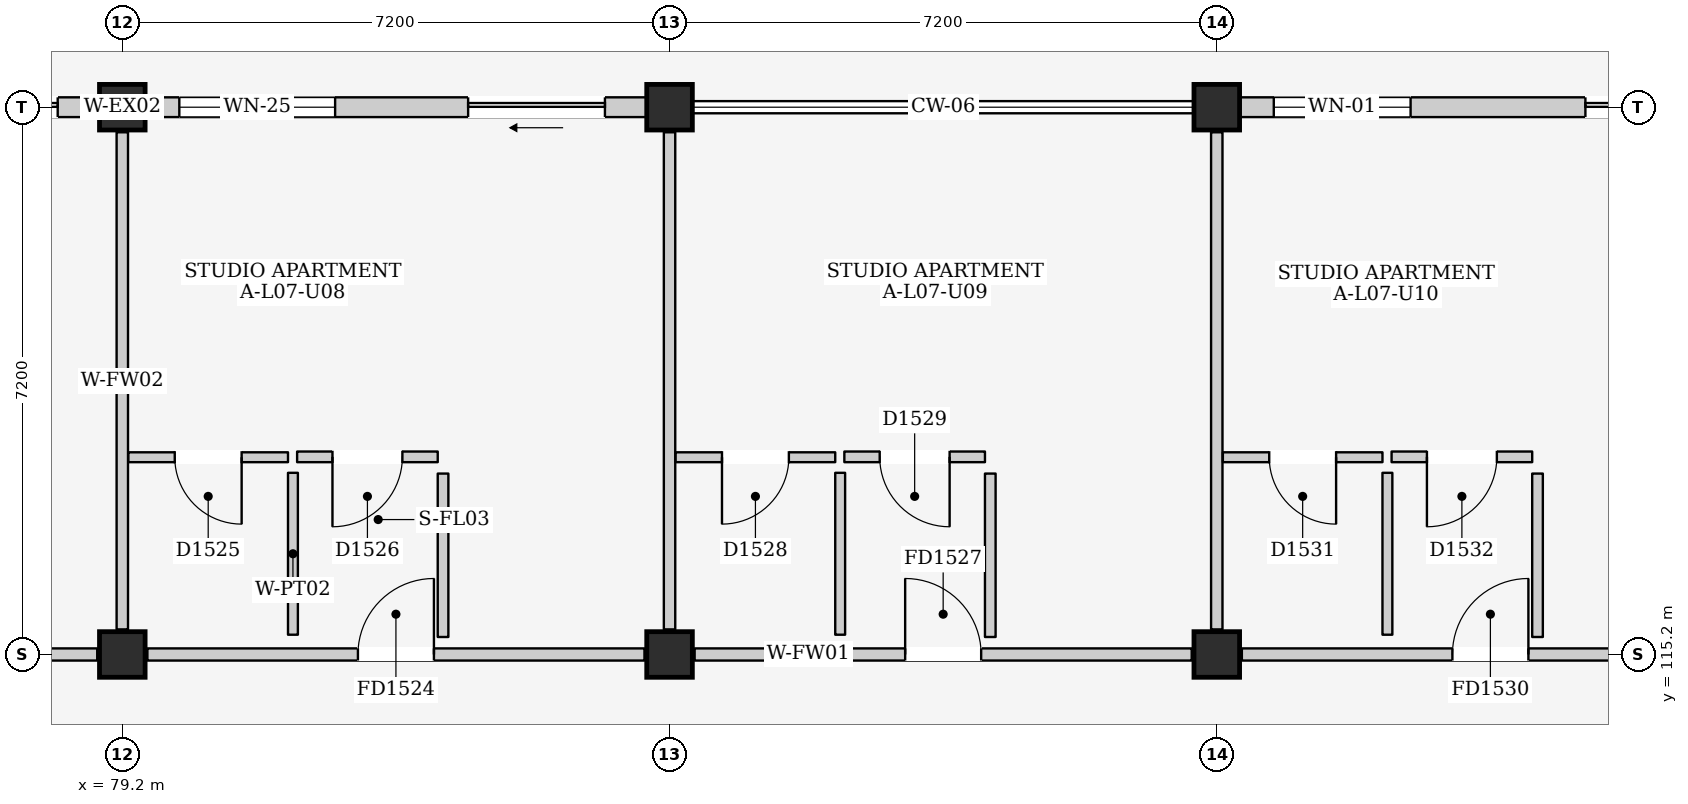
"""IFC4 building model, lengths in metres.
Left out: names, types, materials, properties, quantities, classifications, styles, units other than length and angle.
Written with IfcOpenShell. Run it as: python <this file> out.ifc"""

import sys

from ifc_helpers import new_model, si_unit, direction, frame, frame_2d, origin, origin_2d, place, context, subcontext, project, spatial, rectangle, extrude, element, fill, save


model = new_model("IFC4")
c1 = context("Model", 3, precision=1e-05, world=origin(), true_north=direction((0.0, 1.0)))
c2 = subcontext(c1, "Body", "Model", "MODEL_VIEW")
j1 = project(units=[si_unit("LENGTHUNIT", "METRE"), si_unit("PLANEANGLEUNIT", "RADIAN")], contexts=[c1])
p1 = place(None, origin())
s1 = spatial("IfcSite", under=j1, at=p1, CompositionType="ELEMENT")
p2 = place(p1, origin())
s2 = spatial("IfcBuilding", under=s1, at=p2, CompositionType="ELEMENT")
p3 = place(p2, frame((0.0, 0.0, 25.1)))
s3 = spatial("IfcBuildingStorey", under=s2, at=p3, CompositionType="ELEMENT", Elevation=25.1)
for number, where, z_axis, x_axis in (
    (1, (79.2, 115.2, 0.0), (0.0, 0.0, 1.0), (1.0, 0.0, 0.0)),
    (2, (79.2, 122.4, 0.0), (0.0, 0.0, 1.0), (1.0, 0.0, 0.0)),
    (3, (86.4, 115.2, 0.0), (0.0, 0.0, 1.0), (1.0, 0.0, 0.0)),
    (4, (86.4, 122.4, 0.0), (0.0, 0.0, 1.0), (1.0, 0.0, 0.0)),
    (5, (93.6, 115.2, 0.0), (0.0, 0.0, 1.0), (1.0, 0.0, 0.0)),
    (6, (93.6, 122.4, 0.0), (0.0, 0.0, 1.0), (1.0, 0.0, 0.0)),
):
    element("IfcColumn", number, at=place(p3, frame(where, z_axis=z_axis, x_axis=x_axis)), inside=s3, PredefinedType="COLUMN", context=c2, shape_type="SweptSolid", body=[
        extrude(rectangle(XDim=0.6, YDim=0.6, at=origin_2d()), origin(), (0.0, 0.0, 1.0), 3.2),
    ])
p4 = place(p3, frame((72.3, 122.4, 0.0), z_axis=(0.0, 0.0, 1.0), x_axis=(1.0, 0.0, 0.0)))
e7 = element("IfcWall", 7, at=p4, inside=s3, PredefinedType="ELEMENTEDWALL", context=c2, shape_type="SweptSolid", body=[
    extrude(rectangle(XDim=6.6, YDim=0.26, at=frame_2d((3.3, 0.0))), origin(), (0.0, 0.0, 1.0), 2.525),
])
p5 = place(p4, frame((4.65, 0.0, 0.0)))
e8 = element("IfcOpeningElement", 8, at=p5, cuts=e7, PredefinedType="OPENING", context=c2, shape_type="SweptSolid", body=[
    extrude(rectangle(XDim=1.4, YDim=2.1, at=frame_2d((0.7, 1.05))), frame((0.0, 0.145, 0.0), z_axis=(0.0, -1.0, 0.0), x_axis=(1.0, 0.0, 0.0)), (0.0, 0.0, 1.0), 0.29),
])
p6 = place(p4, frame((0.45, 0.0, 0.9)))
e9 = element("IfcOpeningElement", 9, at=p6, cuts=e7, PredefinedType="OPENING", context=c2, shape_type="SweptSolid", body=[
    extrude(rectangle(XDim=1.3, YDim=1.25, at=frame_2d((0.65, 0.625))), frame((0.0, 0.145, 0.0), z_axis=(0.0, -1.0, 0.0), x_axis=(1.0, 0.0, 0.0)), (0.0, 0.0, 1.0), 0.29),
])
p7 = place(p3, frame((79.5, 122.4, 0.0), z_axis=(0.0, 0.0, 1.0), x_axis=(1.0, 0.0, 0.0)))
e10 = element("IfcWall", 10, at=p7, inside=s3, PredefinedType="ELEMENTEDWALL", context=c2, shape_type="SweptSolid", body=[
    extrude(rectangle(XDim=6.6, YDim=0.26, at=frame_2d((3.3, 0.0))), origin(), (0.0, 0.0, 1.0), 2.525),
])
p8 = place(p7, frame((4.25, 0.0, 0.0)))
e11 = element("IfcOpeningElement", 11, at=p8, cuts=e10, PredefinedType="OPENING", context=c2, shape_type="SweptSolid", body=[
    extrude(rectangle(XDim=1.8, YDim=2.12, at=frame_2d((0.9, 1.06))), frame((0.0, 0.145, 0.0), z_axis=(0.0, -1.0, 0.0), x_axis=(1.0, 0.0, 0.0)), (0.0, 0.0, 1.0), 0.29),
])
p9 = place(p7, frame((0.45, 0.0, 0.815)))
e12 = element("IfcOpeningElement", 12, at=p9, cuts=e10, PredefinedType="OPENING", context=c2, shape_type="SweptSolid", body=[
    extrude(rectangle(XDim=2.05, YDim=1.6, at=frame_2d((1.025, 0.8))), frame((0.0, 0.145, 0.0), z_axis=(0.0, -1.0, 0.0), x_axis=(1.0, 0.0, 0.0)), (0.0, 0.0, 1.0), 0.29),
])
p10 = place(p3, frame((93.9, 122.4, 0.0), z_axis=(0.0, 0.0, 1.0), x_axis=(1.0, 0.0, 0.0)))
e13 = element("IfcWall", 13, at=p10, inside=s3, PredefinedType="ELEMENTEDWALL", context=c2, shape_type="SweptSolid", body=[
    extrude(rectangle(XDim=6.6, YDim=0.26, at=frame_2d((3.3, 0.0))), origin(), (0.0, 0.0, 1.0), 2.525),
])
p11 = place(p10, frame((4.55, 0.0, 0.0)))
e14 = element("IfcOpeningElement", 14, at=p11, cuts=e13, PredefinedType="OPENING", context=c2, shape_type="SweptSolid", body=[
    extrude(rectangle(XDim=1.5, YDim=2.12, at=frame_2d((0.75, 1.06))), frame((0.0, 0.145, 0.0), z_axis=(0.0, -1.0, 0.0), x_axis=(1.0, 0.0, 0.0)), (0.0, 0.0, 1.0), 0.29),
])
p12 = place(p10, frame((0.45, 0.0, 0.9)))
e15 = element("IfcOpeningElement", 15, at=p12, cuts=e13, PredefinedType="OPENING", context=c2, shape_type="SweptSolid", body=[
    extrude(rectangle(XDim=1.8, YDim=1.5, at=frame_2d((0.9, 0.75))), frame((0.0, 0.145, 0.0), z_axis=(0.0, -1.0, 0.0), x_axis=(1.0, 0.0, 0.0)), (0.0, 0.0, 1.0), 0.29),
])
p13 = place(p3, frame((72.33, 115.2, 0.0), z_axis=(0.0, 0.0, 1.0), x_axis=(1.0, 0.0, 0.0)))
e16 = element("IfcWall", 16, at=p13, inside=s3, PredefinedType="PARTITIONING", context=c2, shape_type="SweptSolid", body=[
    extrude(rectangle(XDim=6.54, YDim=0.16, at=frame_2d((3.27, 0.0))), origin(), (0.0, 0.0, 1.0), 2.325),
])
p14 = place(p13, frame((2.77, 0.0, 0.0)))
e17 = element("IfcOpeningElement", 17, at=p14, cuts=e16, PredefinedType="OPENING", context=c2, shape_type="SweptSolid", body=[
    extrude(rectangle(XDim=1.0, YDim=2.15, at=frame_2d((0.5, 1.075))), frame((0.0, 0.095, 0.0), z_axis=(0.0, -1.0, 0.0), x_axis=(1.0, 0.0, 0.0)), (0.0, 0.0, 1.0), 0.19),
])
p15 = place(p3, frame((79.2, 115.53, 0.0), z_axis=(0.0, 0.0, 1.0), x_axis=(0.0, 1.0, 0.0)))
e18 = element("IfcWall", 18, at=p15, inside=s3, PredefinedType="PARTITIONING", context=c2, shape_type="SweptSolid", body=[
    extrude(rectangle(XDim=6.54, YDim=0.15, at=frame_2d((3.27, 0.0))), origin(), (0.0, 0.0, 1.0), 2.475),
])
p16 = place(p3, frame((79.53, 115.2, 0.0), z_axis=(0.0, 0.0, 1.0), x_axis=(1.0, 0.0, 0.0)))
e19 = element("IfcWall", 19, at=p16, inside=s3, PredefinedType="PARTITIONING", context=c2, shape_type="SweptSolid", body=[
    extrude(rectangle(XDim=6.54, YDim=0.16, at=frame_2d((3.27, 0.0))), origin(), (0.0, 0.0, 1.0), 2.325),
])
p17 = place(p16, frame((2.77, 0.0, 0.0)))
e20 = element("IfcOpeningElement", 20, at=p17, cuts=e19, PredefinedType="OPENING", context=c2, shape_type="SweptSolid", body=[
    extrude(rectangle(XDim=1.0, YDim=2.15, at=frame_2d((0.5, 1.075))), frame((0.0, 0.095, 0.0), z_axis=(0.0, -1.0, 0.0), x_axis=(1.0, 0.0, 0.0)), (0.0, 0.0, 1.0), 0.19),
])
p18 = place(p3, frame((86.4, 115.53, 0.0), z_axis=(0.0, 0.0, 1.0), x_axis=(0.0, 1.0, 0.0)))
e21 = element("IfcWall", 21, at=p18, inside=s3, PredefinedType="PARTITIONING", context=c2, shape_type="SweptSolid", body=[
    extrude(rectangle(XDim=6.54, YDim=0.15, at=frame_2d((3.27, 0.0))), origin(), (0.0, 0.0, 1.0), 2.475),
])
p19 = place(p3, frame((79.28, 117.795, 0.0), z_axis=(0.0, 0.0, 1.0), x_axis=(1.0, 0.0, 0.0)))
e22 = element("IfcWall", 22, at=p19, inside=s3, PredefinedType="PARTITIONING", context=c2, shape_type="SweptSolid", body=[
    extrude(rectangle(XDim=2.1, YDim=0.13, at=frame_2d((1.05, 0.0))), origin(), (0.0, 0.0, 1.0), 2.99),
])
p20 = place(p19, frame((0.61, 0.0, 0.0)))
e23 = element("IfcOpeningElement", 23, at=p20, cuts=e22, PredefinedType="OPENING", context=c2, shape_type="SweptSolid", body=[
    extrude(rectangle(XDim=0.88, YDim=2.1, at=frame_2d((0.44, 1.05))), frame((0.0, 0.08, 0.0), z_axis=(0.0, -1.0, 0.0), x_axis=(1.0, 0.0, 0.0)), (0.0, 0.0, 1.0), 0.16),
])
p21 = place(p3, frame((81.445, 115.46, 0.0), z_axis=(0.0, 0.0, 1.0), x_axis=(0.0, 1.0, 0.0)))
e24 = element("IfcWall", 24, at=p21, inside=s3, PredefinedType="PARTITIONING", context=c2, shape_type="SweptSolid", body=[
    extrude(rectangle(XDim=2.13, YDim=0.13, at=frame_2d((1.065, 0.0))), origin(), (0.0, 0.0, 1.0), 2.99),
])
p22 = place(p3, frame((81.5, 117.8, 0.0), z_axis=(0.0, 0.0, 1.0), x_axis=(1.0, 0.0, 0.0)))
e25 = element("IfcWall", 25, at=p22, inside=s3, PredefinedType="PARTITIONING", context=c2, shape_type="SweptSolid", body=[
    extrude(rectangle(XDim=1.85, YDim=0.14, at=frame_2d((0.925, 0.0))), origin(), (0.0, 0.0, 1.0), 2.99),
])
p23 = place(p22, frame((0.465, 0.0, 0.0)))
e26 = element("IfcOpeningElement", 26, at=p23, cuts=e25, PredefinedType="OPENING", context=c2, shape_type="SweptSolid", body=[
    extrude(rectangle(XDim=0.92, YDim=2.1, at=frame_2d((0.46, 1.05))), frame((0.0, 0.085, 0.0), z_axis=(0.0, -1.0, 0.0), x_axis=(1.0, 0.0, 0.0)), (0.0, 0.0, 1.0), 0.17),
])
p24 = place(p3, frame((83.42, 115.43, 0.0), z_axis=(0.0, 0.0, 1.0), x_axis=(0.0, 1.0, 0.0)))
e27 = element("IfcWall", 27, at=p24, inside=s3, PredefinedType="PARTITIONING", context=c2, shape_type="SweptSolid", body=[
    extrude(rectangle(XDim=2.15, YDim=0.14, at=frame_2d((1.075, 0.0))), origin(), (0.0, 0.0, 1.0), 2.99),
])
p25 = place(p3, frame((86.73, 115.2, 0.0), z_axis=(0.0, 0.0, 1.0), x_axis=(1.0, 0.0, 0.0)))
e28 = element("IfcWall", 28, at=p25, inside=s3, PredefinedType="PARTITIONING", context=c2, shape_type="SweptSolid", body=[
    extrude(rectangle(XDim=6.54, YDim=0.16, at=frame_2d((3.27, 0.0))), origin(), (0.0, 0.0, 1.0), 2.325),
])
p26 = place(p25, frame((2.77, 0.0, 0.0)))
e29 = element("IfcOpeningElement", 29, at=p26, cuts=e28, PredefinedType="OPENING", context=c2, shape_type="SweptSolid", body=[
    extrude(rectangle(XDim=1.0, YDim=2.15, at=frame_2d((0.5, 1.075))), frame((0.0, 0.095, 0.0), z_axis=(0.0, -1.0, 0.0), x_axis=(1.0, 0.0, 0.0)), (0.0, 0.0, 1.0), 0.19),
])
p27 = place(p3, frame((93.6, 115.53, 0.0), z_axis=(0.0, 0.0, 1.0), x_axis=(0.0, 1.0, 0.0)))
e30 = element("IfcWall", 30, at=p27, inside=s3, PredefinedType="PARTITIONING", context=c2, shape_type="SweptSolid", body=[
    extrude(rectangle(XDim=6.54, YDim=0.15, at=frame_2d((3.27, 0.0))), origin(), (0.0, 0.0, 1.0), 2.475),
])
p28 = place(p3, frame((86.48, 117.795, 0.0), z_axis=(0.0, 0.0, 1.0), x_axis=(1.0, 0.0, 0.0)))
e31 = element("IfcWall", 31, at=p28, inside=s3, PredefinedType="PARTITIONING", context=c2, shape_type="SweptSolid", body=[
    extrude(rectangle(XDim=2.1, YDim=0.13, at=frame_2d((1.05, 0.0))), origin(), (0.0, 0.0, 1.0), 2.99),
])
p29 = place(p28, frame((0.61, 0.0, 0.0)))
e32 = element("IfcOpeningElement", 32, at=p29, cuts=e31, PredefinedType="OPENING", context=c2, shape_type="SweptSolid", body=[
    extrude(rectangle(XDim=0.88, YDim=2.1, at=frame_2d((0.44, 1.05))), frame((0.0, 0.08, 0.0), z_axis=(0.0, -1.0, 0.0), x_axis=(1.0, 0.0, 0.0)), (0.0, 0.0, 1.0), 0.16),
])
p30 = place(p3, frame((88.645, 115.46, 0.0), z_axis=(0.0, 0.0, 1.0), x_axis=(0.0, 1.0, 0.0)))
e33 = element("IfcWall", 33, at=p30, inside=s3, PredefinedType="PARTITIONING", context=c2, shape_type="SweptSolid", body=[
    extrude(rectangle(XDim=2.13, YDim=0.13, at=frame_2d((1.065, 0.0))), origin(), (0.0, 0.0, 1.0), 2.99),
])
p31 = place(p3, frame((88.7, 117.8, 0.0), z_axis=(0.0, 0.0, 1.0), x_axis=(1.0, 0.0, 0.0)))
e34 = element("IfcWall", 34, at=p31, inside=s3, PredefinedType="PARTITIONING", context=c2, shape_type="SweptSolid", body=[
    extrude(rectangle(XDim=1.85, YDim=0.14, at=frame_2d((0.925, 0.0))), origin(), (0.0, 0.0, 1.0), 2.99),
])
p32 = place(p31, frame((0.465, 0.0, 0.0)))
e35 = element("IfcOpeningElement", 35, at=p32, cuts=e34, PredefinedType="OPENING", context=c2, shape_type="SweptSolid", body=[
    extrude(rectangle(XDim=0.92, YDim=2.1, at=frame_2d((0.46, 1.05))), frame((0.0, 0.085, 0.0), z_axis=(0.0, -1.0, 0.0), x_axis=(1.0, 0.0, 0.0)), (0.0, 0.0, 1.0), 0.17),
])
p33 = place(p3, frame((90.62, 115.43, 0.0), z_axis=(0.0, 0.0, 1.0), x_axis=(0.0, 1.0, 0.0)))
e36 = element("IfcWall", 36, at=p33, inside=s3, PredefinedType="PARTITIONING", context=c2, shape_type="SweptSolid", body=[
    extrude(rectangle(XDim=2.15, YDim=0.14, at=frame_2d((1.075, 0.0))), origin(), (0.0, 0.0, 1.0), 2.99),
])
p34 = place(p3, frame((93.93, 115.2, 0.0), z_axis=(0.0, 0.0, 1.0), x_axis=(1.0, 0.0, 0.0)))
e37 = element("IfcWall", 37, at=p34, inside=s3, PredefinedType="PARTITIONING", context=c2, shape_type="SweptSolid", body=[
    extrude(rectangle(XDim=6.54, YDim=0.16, at=frame_2d((3.27, 0.0))), origin(), (0.0, 0.0, 1.0), 2.325),
])
p35 = place(p34, frame((2.77, 0.0, 0.0)))
e38 = element("IfcOpeningElement", 38, at=p35, cuts=e37, PredefinedType="OPENING", context=c2, shape_type="SweptSolid", body=[
    extrude(rectangle(XDim=1.0, YDim=2.15, at=frame_2d((0.5, 1.075))), frame((0.0, 0.095, 0.0), z_axis=(0.0, -1.0, 0.0), x_axis=(1.0, 0.0, 0.0)), (0.0, 0.0, 1.0), 0.19),
])
p36 = place(p3, frame((93.68, 117.795, 0.0), z_axis=(0.0, 0.0, 1.0), x_axis=(1.0, 0.0, 0.0)))
e39 = element("IfcWall", 39, at=p36, inside=s3, PredefinedType="PARTITIONING", context=c2, shape_type="SweptSolid", body=[
    extrude(rectangle(XDim=2.1, YDim=0.13, at=frame_2d((1.05, 0.0))), origin(), (0.0, 0.0, 1.0), 2.99),
])
p37 = place(p36, frame((0.61, 0.0, 0.0)))
e40 = element("IfcOpeningElement", 40, at=p37, cuts=e39, PredefinedType="OPENING", context=c2, shape_type="SweptSolid", body=[
    extrude(rectangle(XDim=0.88, YDim=2.1, at=frame_2d((0.44, 1.05))), frame((0.0, 0.08, 0.0), z_axis=(0.0, -1.0, 0.0), x_axis=(1.0, 0.0, 0.0)), (0.0, 0.0, 1.0), 0.16),
])
p38 = place(p3, frame((95.845, 115.46, 0.0), z_axis=(0.0, 0.0, 1.0), x_axis=(0.0, 1.0, 0.0)))
e41 = element("IfcWall", 41, at=p38, inside=s3, PredefinedType="PARTITIONING", context=c2, shape_type="SweptSolid", body=[
    extrude(rectangle(XDim=2.13, YDim=0.13, at=frame_2d((1.065, 0.0))), origin(), (0.0, 0.0, 1.0), 2.99),
])
p39 = place(p3, frame((95.9, 117.8, 0.0), z_axis=(0.0, 0.0, 1.0), x_axis=(1.0, 0.0, 0.0)))
e42 = element("IfcWall", 42, at=p39, inside=s3, PredefinedType="PARTITIONING", context=c2, shape_type="SweptSolid", body=[
    extrude(rectangle(XDim=1.85, YDim=0.14, at=frame_2d((0.925, 0.0))), origin(), (0.0, 0.0, 1.0), 2.99),
])
p40 = place(p39, frame((0.465, 0.0, 0.0)))
e43 = element("IfcOpeningElement", 43, at=p40, cuts=e42, PredefinedType="OPENING", context=c2, shape_type="SweptSolid", body=[
    extrude(rectangle(XDim=0.92, YDim=2.1, at=frame_2d((0.46, 1.05))), frame((0.0, 0.085, 0.0), z_axis=(0.0, -1.0, 0.0), x_axis=(1.0, 0.0, 0.0)), (0.0, 0.0, 1.0), 0.17),
])
p41 = place(p3, frame((97.82, 115.43, 0.0), z_axis=(0.0, 0.0, 1.0), x_axis=(0.0, 1.0, 0.0)))
e44 = element("IfcWall", 44, at=p41, inside=s3, PredefinedType="PARTITIONING", context=c2, shape_type="SweptSolid", body=[
    extrude(rectangle(XDim=2.15, YDim=0.14, at=frame_2d((1.075, 0.0))), origin(), (0.0, 0.0, 1.0), 2.99),
])
p42 = place(p5, frame((1.4, 0.0, 0.0), z_axis=(0.0, 0.0, 1.0), x_axis=(-1.0, 0.0, 0.0)))
e45 = element("IfcDoor", 45, at=p42, inside=s3, OperationType="SLIDING_TO_RIGHT", PredefinedType="DOOR", context=c2, shape_type="SweptSolid", body=[
    extrude(rectangle(XDim=1.4, YDim=2.1, at=frame_2d((0.7, 1.05))), frame((0.0, 0.025, 0.0), z_axis=(0.0, -1.0, 0.0), x_axis=(1.0, 0.0, 0.0)), (0.0, 0.0, 1.0), 0.05),
])
fill(e8, e45)
p43 = place(p8, frame((1.8, 0.0, 0.0), z_axis=(0.0, 0.0, 1.0), x_axis=(-1.0, 0.0, 0.0)))
e46 = element("IfcDoor", 46, at=p43, inside=s3, OperationType="SLIDING_TO_LEFT", PredefinedType="DOOR", context=c2, shape_type="SweptSolid", body=[
    extrude(rectangle(XDim=1.8, YDim=2.12, at=frame_2d((0.9, 1.06))), frame((0.0, 0.025, 0.0), z_axis=(0.0, -1.0, 0.0), x_axis=(1.0, 0.0, 0.0)), (0.0, 0.0, 1.0), 0.05),
])
fill(e11, e46)
p44 = place(p9, origin())
e47 = element("IfcWindow", 47, at=p44, inside=s3, PartitioningType="DOUBLE_PANEL_VERTICAL", PredefinedType="WINDOW", context=c2, shape_type="SweptSolid", body=[
    extrude(rectangle(XDim=2.05, YDim=1.6, at=frame_2d((1.025, 0.8))), frame((0.0, 0.03, 0.0), z_axis=(0.0, -1.0, 0.0), x_axis=(1.0, 0.0, 0.0)), (0.0, 0.0, 1.0), 0.06),
])
fill(e12, e47)
p45 = place(p11, frame((1.5, 0.0, 0.0), z_axis=(0.0, 0.0, 1.0), x_axis=(-1.0, 0.0, 0.0)))
e48 = element("IfcDoor", 48, at=p45, inside=s3, OperationType="SLIDING_TO_LEFT", PredefinedType="DOOR", context=c2, shape_type="SweptSolid", body=[
    extrude(rectangle(XDim=1.5, YDim=2.12, at=frame_2d((0.75, 1.06))), frame((0.0, 0.025, 0.0), z_axis=(0.0, -1.0, 0.0), x_axis=(1.0, 0.0, 0.0)), (0.0, 0.0, 1.0), 0.05),
])
fill(e14, e48)
p46 = place(p12, origin())
e49 = element("IfcWindow", 49, at=p46, inside=s3, PartitioningType="DOUBLE_PANEL_VERTICAL", PredefinedType="WINDOW", context=c2, shape_type="SweptSolid", body=[
    extrude(rectangle(XDim=1.8, YDim=1.5, at=frame_2d((0.9, 0.75))), frame((0.0, 0.03, 0.0), z_axis=(0.0, -1.0, 0.0), x_axis=(1.0, 0.0, 0.0)), (0.0, 0.0, 1.0), 0.06),
])
fill(e15, e49)
p47 = place(p17, origin())
e50 = element("IfcDoor", 50, at=p47, inside=s3, OperationType="SINGLE_SWING_RIGHT", PredefinedType="DOOR", context=c2, shape_type="SweptSolid", body=[
    extrude(rectangle(XDim=1.0, YDim=2.15, at=frame_2d((0.5, 1.075))), frame((0.0, 0.025, 0.0), z_axis=(0.0, -1.0, 0.0), x_axis=(1.0, 0.0, 0.0)), (0.0, 0.0, 1.0), 0.05),
])
fill(e20, e50)
p48 = place(p20, frame((0.88, 0.0, 0.0), z_axis=(0.0, 0.0, 1.0), x_axis=(-1.0, 0.0, 0.0)))
e51 = element("IfcDoor", 51, at=p48, inside=s3, OperationType="SINGLE_SWING_LEFT", PredefinedType="DOOR", context=c2, shape_type="SweptSolid", body=[
    extrude(rectangle(XDim=0.88, YDim=2.1, at=frame_2d((0.44, 1.05))), frame((0.0, 0.025, 0.0), z_axis=(0.0, -1.0, 0.0), x_axis=(1.0, 0.0, 0.0)), (0.0, 0.0, 1.0), 0.05),
])
fill(e23, e51)
p49 = place(p23, frame((0.92, 0.0, 0.0), z_axis=(0.0, 0.0, 1.0), x_axis=(-1.0, 0.0, 0.0)))
e52 = element("IfcDoor", 52, at=p49, inside=s3, OperationType="SINGLE_SWING_RIGHT", PredefinedType="DOOR", context=c2, shape_type="SweptSolid", body=[
    extrude(rectangle(XDim=0.92, YDim=2.1, at=frame_2d((0.46, 1.05))), frame((0.0, 0.025, 0.0), z_axis=(0.0, -1.0, 0.0), x_axis=(1.0, 0.0, 0.0)), (0.0, 0.0, 1.0), 0.05),
])
fill(e26, e52)
p50 = place(p26, origin())
e53 = element("IfcDoor", 53, at=p50, inside=s3, OperationType="SINGLE_SWING_LEFT", PredefinedType="DOOR", context=c2, shape_type="SweptSolid", body=[
    extrude(rectangle(XDim=1.0, YDim=2.15, at=frame_2d((0.5, 1.075))), frame((0.0, 0.025, 0.0), z_axis=(0.0, -1.0, 0.0), x_axis=(1.0, 0.0, 0.0)), (0.0, 0.0, 1.0), 0.05),
])
fill(e29, e53)
p51 = place(p29, frame((0.88, 0.0, 0.0), z_axis=(0.0, 0.0, 1.0), x_axis=(-1.0, 0.0, 0.0)))
e54 = element("IfcDoor", 54, at=p51, inside=s3, OperationType="SINGLE_SWING_RIGHT", PredefinedType="DOOR", context=c2, shape_type="SweptSolid", body=[
    extrude(rectangle(XDim=0.88, YDim=2.1, at=frame_2d((0.44, 1.05))), frame((0.0, 0.025, 0.0), z_axis=(0.0, -1.0, 0.0), x_axis=(1.0, 0.0, 0.0)), (0.0, 0.0, 1.0), 0.05),
])
fill(e32, e54)
p52 = place(p32, frame((0.92, 0.0, 0.0), z_axis=(0.0, 0.0, 1.0), x_axis=(-1.0, 0.0, 0.0)))
e55 = element("IfcDoor", 55, at=p52, inside=s3, OperationType="SINGLE_SWING_LEFT", PredefinedType="DOOR", context=c2, shape_type="SweptSolid", body=[
    extrude(rectangle(XDim=0.92, YDim=2.1, at=frame_2d((0.46, 1.05))), frame((0.0, 0.025, 0.0), z_axis=(0.0, -1.0, 0.0), x_axis=(1.0, 0.0, 0.0)), (0.0, 0.0, 1.0), 0.05),
])
fill(e35, e55)
p53 = place(p35, origin())
e56 = element("IfcDoor", 56, at=p53, inside=s3, OperationType="SINGLE_SWING_RIGHT", PredefinedType="DOOR", context=c2, shape_type="SweptSolid", body=[
    extrude(rectangle(XDim=1.0, YDim=2.15, at=frame_2d((0.5, 1.075))), frame((0.0, 0.025, 0.0), z_axis=(0.0, -1.0, 0.0), x_axis=(1.0, 0.0, 0.0)), (0.0, 0.0, 1.0), 0.05),
])
fill(e38, e56)
p54 = place(p37, frame((0.88, 0.0, 0.0), z_axis=(0.0, 0.0, 1.0), x_axis=(-1.0, 0.0, 0.0)))
e57 = element("IfcDoor", 57, at=p54, inside=s3, OperationType="SINGLE_SWING_LEFT", PredefinedType="DOOR", context=c2, shape_type="SweptSolid", body=[
    extrude(rectangle(XDim=0.88, YDim=2.1, at=frame_2d((0.44, 1.05))), frame((0.0, 0.025, 0.0), z_axis=(0.0, -1.0, 0.0), x_axis=(1.0, 0.0, 0.0)), (0.0, 0.0, 1.0), 0.05),
])
fill(e40, e57)
p55 = place(p40, frame((0.92, 0.0, 0.0), z_axis=(0.0, 0.0, 1.0), x_axis=(-1.0, 0.0, 0.0)))
e58 = element("IfcDoor", 58, at=p55, inside=s3, OperationType="SINGLE_SWING_RIGHT", PredefinedType="DOOR", context=c2, shape_type="SweptSolid", body=[
    extrude(rectangle(XDim=0.92, YDim=2.1, at=frame_2d((0.46, 1.05))), frame((0.0, 0.025, 0.0), z_axis=(0.0, -1.0, 0.0), x_axis=(1.0, 0.0, 0.0)), (0.0, 0.0, 1.0), 0.05),
])
fill(e43, e58)
save(model, sys.argv[1])
